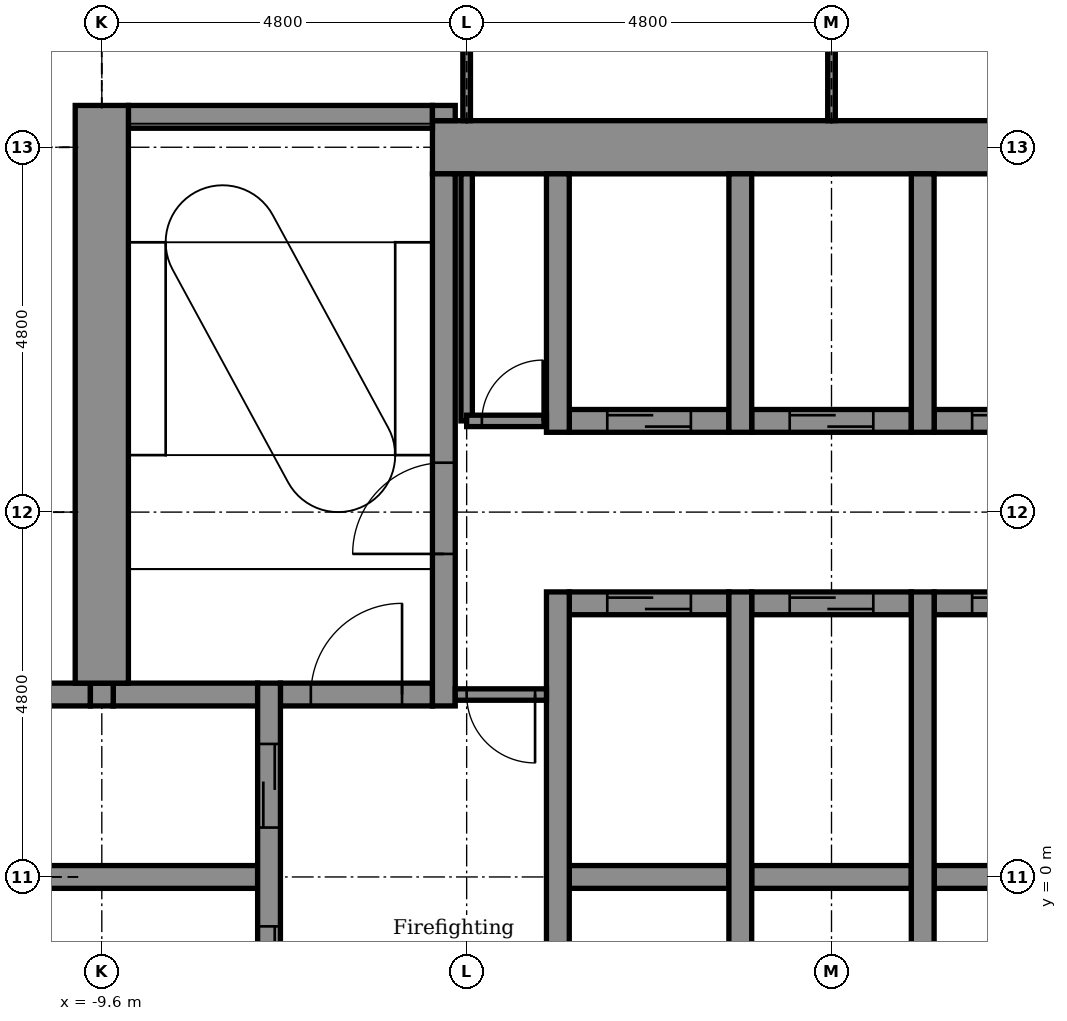
"""IFC4 building model, lengths in metres.
Left out: names, types, materials, properties, quantities, classifications, styles, units other than length and angle.
Written with IfcOpenShell. Run it as: python <this file> out.ifc"""

import sys

from ifc_helpers import new_model, si_unit, direction, frame, frame_2d, origin, place, context, subcontext, project, spatial, rectangle, extrude, element, fill, save


model = new_model("IFC4")
c1 = context("Model", 3, precision=1e-05, world=origin(), true_north=direction((0.0, 1.0)))
c2 = subcontext(c1, "Body", "Model", "MODEL_VIEW")
j1 = project(units=[si_unit("LENGTHUNIT", "METRE"), si_unit("PLANEANGLEUNIT", "RADIAN")], contexts=[c1])
p1 = place(None, origin())
s1 = spatial("IfcSite", under=j1, at=p1, CompositionType="ELEMENT")
p2 = place(p1, origin())
s2 = spatial("IfcBuilding", under=s1, at=p2, CompositionType="ELEMENT")
p3 = place(p2, frame((0.0, 0.0, 154.4)))
s3 = spatial("IfcBuildingStorey", under=s2, at=p3, CompositionType="ELEMENT", Elevation=154.4)
p4 = place(p3, frame((-10.85, 0.0, -0.15), z_axis=(0.0, 0.0, 1.0), x_axis=(1.0, 0.0, 0.0)))
e1 = element("IfcWall", 1, at=p4, inside=s3, PredefinedType="STANDARD", context=c2, shape_type="SweptSolid", body=[
    extrude(rectangle(XDim=3.3, YDim=0.3, at=frame_2d((1.65, 0.0))), origin(), (0.0, 0.0, 1.0), 3.9),
])
p5 = place(p3, frame((-3.45, 0.0, -0.15), z_axis=(0.0, 0.0, 1.0), x_axis=(1.0, 0.0, 0.0)))
e2 = element("IfcWall", 2, at=p5, inside=s3, PredefinedType="STANDARD", context=c2, shape_type="SweptSolid", body=[
    extrude(rectangle(XDim=2.1, YDim=0.3, at=frame_2d((1.05, 0.0))), origin(), (0.0, 0.0, 1.0), 3.9),
])
p6 = place(p3, frame((-1.05, 0.0, -0.15), z_axis=(0.0, 0.0, 1.0), x_axis=(1.0, 0.0, 0.0)))
e3 = element("IfcWall", 3, at=p6, inside=s3, PredefinedType="STANDARD", context=c2, shape_type="SweptSolid", body=[
    extrude(rectangle(XDim=2.1, YDim=0.3, at=frame_2d((1.05, 0.0))), origin(), (0.0, 0.0, 1.0), 3.9),
])
p7 = place(p3, frame((1.35, 0.0, -0.15), z_axis=(0.0, 0.0, 1.0), x_axis=(1.0, 0.0, 0.0)))
e4 = element("IfcWall", 4, at=p7, inside=s3, PredefinedType="STANDARD", context=c2, shape_type="SweptSolid", body=[
    extrude(rectangle(XDim=2.1, YDim=0.3, at=frame_2d((1.05, 0.0))), origin(), (0.0, 0.0, 1.0), 3.9),
])
p8 = place(p3, frame((-10.85, 2.4, -0.15), z_axis=(0.0, 0.0, 1.0), x_axis=(1.0, 0.0, 0.0)))
e5 = element("IfcWall", 5, at=p8, inside=s3, PredefinedType="STANDARD", context=c2, shape_type="SweptSolid", body=[
    extrude(rectangle(XDim=1.1, YDim=0.3, at=frame_2d((0.55, 0.0))), origin(), (0.0, 0.0, 1.0), 3.9),
])
p9 = place(p3, frame((-9.45, 2.4, -0.15), z_axis=(0.0, 0.0, 1.0), x_axis=(1.0, 0.0, 0.0)))
e6 = element("IfcWall", 6, at=p9, inside=s3, PredefinedType="STANDARD", context=c2, shape_type="SweptSolid", body=[
    extrude(rectangle(XDim=1.9, YDim=0.3, at=frame_2d((0.95, 0.0))), origin(), (0.0, 0.0, 1.0), 3.9),
])
p10 = place(p3, frame((-7.25, 2.4, -0.15), z_axis=(0.0, 0.0, 1.0), x_axis=(1.0, 0.0, 0.0)))
e7 = element("IfcWall", 7, at=p10, inside=s3, PredefinedType="STANDARD", context=c2, shape_type="SweptSolid", body=[
    extrude(rectangle(XDim=2.0, YDim=0.3, at=frame_2d((1.0, 0.0))), origin(), (0.0, 0.0, 1.0), 3.9),
])
p11 = place(p10, frame((0.4, 0.0, 0.15)))
e8 = element("IfcOpeningElement", 8, at=p11, cuts=e7, PredefinedType="OPENING", context=c2, shape_type="SweptSolid", body=[
    extrude(rectangle(XDim=1.2, YDim=2.1, at=frame_2d((0.6, 1.05))), frame((0.0, 0.16, 0.0), z_axis=(0.0, -1.0, 0.0), x_axis=(1.0, 0.0, 0.0)), (0.0, 0.0, 1.0), 0.32),
])
p12 = place(p3, frame((-3.45, 3.6, -0.15), z_axis=(0.0, 0.0, 1.0), x_axis=(1.0, 0.0, 0.0)))
e9 = element("IfcWall", 9, at=p12, inside=s3, PredefinedType="STANDARD", context=c2, shape_type="SweptSolid", body=[
    extrude(rectangle(XDim=2.1, YDim=0.3, at=frame_2d((1.05, 0.0))), origin(), (0.0, 0.0, 1.0), 3.9),
])
p13 = place(p12, frame((0.5, 0.0, 0.15)))
e10 = element("IfcOpeningElement", 10, at=p13, cuts=e9, PredefinedType="OPENING", context=c2, shape_type="SweptSolid", body=[
    extrude(rectangle(XDim=1.1, YDim=2.1, at=frame_2d((0.55, 1.05))), frame((0.0, 0.16, 0.0), z_axis=(0.0, -1.0, 0.0), x_axis=(1.0, 0.0, 0.0)), (0.0, 0.0, 1.0), 0.32),
])
p14 = place(p3, frame((-1.05, 3.6, -0.15), z_axis=(0.0, 0.0, 1.0), x_axis=(1.0, 0.0, 0.0)))
e11 = element("IfcWall", 11, at=p14, inside=s3, PredefinedType="STANDARD", context=c2, shape_type="SweptSolid", body=[
    extrude(rectangle(XDim=2.1, YDim=0.3, at=frame_2d((1.05, 0.0))), origin(), (0.0, 0.0, 1.0), 3.9),
])
p15 = place(p14, frame((0.5, 0.0, 0.15)))
e12 = element("IfcOpeningElement", 12, at=p15, cuts=e11, PredefinedType="OPENING", context=c2, shape_type="SweptSolid", body=[
    extrude(rectangle(XDim=1.1, YDim=2.1, at=frame_2d((0.55, 1.05))), frame((0.0, 0.16, 0.0), z_axis=(0.0, -1.0, 0.0), x_axis=(1.0, 0.0, 0.0)), (0.0, 0.0, 1.0), 0.32),
])
p16 = place(p3, frame((1.35, 3.6, -0.15), z_axis=(0.0, 0.0, 1.0), x_axis=(1.0, 0.0, 0.0)))
e13 = element("IfcWall", 13, at=p16, inside=s3, PredefinedType="STANDARD", context=c2, shape_type="SweptSolid", body=[
    extrude(rectangle(XDim=2.1, YDim=0.3, at=frame_2d((1.05, 0.0))), origin(), (0.0, 0.0, 1.0), 3.9),
])
p17 = place(p16, frame((0.5, 0.0, 0.15)))
e14 = element("IfcOpeningElement", 14, at=p17, cuts=e13, PredefinedType="OPENING", context=c2, shape_type="SweptSolid", body=[
    extrude(rectangle(XDim=1.1, YDim=2.1, at=frame_2d((0.55, 1.05))), frame((0.0, 0.16, 0.0), z_axis=(0.0, -1.0, 0.0), x_axis=(1.0, 0.0, 0.0)), (0.0, 0.0, 1.0), 0.32),
])
p18 = place(p3, frame((-3.45, 6.0, -0.15), z_axis=(0.0, 0.0, 1.0), x_axis=(1.0, 0.0, 0.0)))
e15 = element("IfcWall", 15, at=p18, inside=s3, PredefinedType="STANDARD", context=c2, shape_type="SweptSolid", body=[
    extrude(rectangle(XDim=2.1, YDim=0.3, at=frame_2d((1.05, 0.0))), origin(), (0.0, 0.0, 1.0), 3.9),
])
p19 = place(p18, frame((0.5, 0.0, 0.15)))
e16 = element("IfcOpeningElement", 16, at=p19, cuts=e15, PredefinedType="OPENING", context=c2, shape_type="SweptSolid", body=[
    extrude(rectangle(XDim=1.1, YDim=2.1, at=frame_2d((0.55, 1.05))), frame((0.0, 0.16, 0.0), z_axis=(0.0, -1.0, 0.0), x_axis=(1.0, 0.0, 0.0)), (0.0, 0.0, 1.0), 0.32),
])
p20 = place(p3, frame((-1.05, 6.0, -0.15), z_axis=(0.0, 0.0, 1.0), x_axis=(1.0, 0.0, 0.0)))
e17 = element("IfcWall", 17, at=p20, inside=s3, PredefinedType="STANDARD", context=c2, shape_type="SweptSolid", body=[
    extrude(rectangle(XDim=2.1, YDim=0.3, at=frame_2d((1.05, 0.0))), origin(), (0.0, 0.0, 1.0), 3.9),
])
p21 = place(p20, frame((0.5, 0.0, 0.15)))
e18 = element("IfcOpeningElement", 18, at=p21, cuts=e17, PredefinedType="OPENING", context=c2, shape_type="SweptSolid", body=[
    extrude(rectangle(XDim=1.1, YDim=2.1, at=frame_2d((0.55, 1.05))), frame((0.0, 0.16, 0.0), z_axis=(0.0, -1.0, 0.0), x_axis=(1.0, 0.0, 0.0)), (0.0, 0.0, 1.0), 0.32),
])
p22 = place(p3, frame((1.35, 6.0, -0.15), z_axis=(0.0, 0.0, 1.0), x_axis=(1.0, 0.0, 0.0)))
e19 = element("IfcWall", 19, at=p22, inside=s3, PredefinedType="STANDARD", context=c2, shape_type="SweptSolid", body=[
    extrude(rectangle(XDim=2.1, YDim=0.3, at=frame_2d((1.05, 0.0))), origin(), (0.0, 0.0, 1.0), 3.9),
])
p23 = place(p22, frame((0.5, 0.0, 0.15)))
e20 = element("IfcOpeningElement", 20, at=p23, cuts=e19, PredefinedType="OPENING", context=c2, shape_type="SweptSolid", body=[
    extrude(rectangle(XDim=1.1, YDim=2.1, at=frame_2d((0.55, 1.05))), frame((0.0, 0.16, 0.0), z_axis=(0.0, -1.0, 0.0), x_axis=(1.0, 0.0, 0.0)), (0.0, 0.0, 1.0), 0.32),
])
p24 = place(p3, frame((-5.25, 9.6, -0.15), z_axis=(0.0, 0.0, 1.0), x_axis=(1.0, 0.0, 0.0)))
e21 = element("IfcWall", 21, at=p24, inside=s3, PredefinedType="SHEAR", context=c2, shape_type="SweptSolid", body=[
    extrude(rectangle(XDim=14.5, YDim=0.7, at=frame_2d((7.25, 0.0))), origin(), (0.0, 0.0, 1.0), 3.9),
])
p25 = place(p24, frame((9.35, 0.0, 0.15)))
e22 = element("IfcOpeningElement", 22, at=p25, cuts=e21, PredefinedType="OPENING", context=c2, shape_type="SweptSolid", body=[
    extrude(rectangle(XDim=1.4, YDim=2.1, at=frame_2d((0.7, 1.05))), frame((0.0, 0.36, 0.0), z_axis=(0.0, -1.0, 0.0), x_axis=(1.0, 0.0, 0.0)), (0.0, 0.0, 1.0), 0.72),
])
p26 = place(p3, frame((-9.25, 10.0, -0.15), z_axis=(0.0, 0.0, 1.0), x_axis=(1.0, 0.0, 0.0)))
e23 = element("IfcWall", 23, at=p26, inside=s3, PredefinedType="STANDARD", context=c2, shape_type="SweptSolid", body=[
    extrude(rectangle(XDim=4.0, YDim=0.3, at=frame_2d((2.0, 0.0))), origin(), (0.0, 0.0, 1.0), 3.9),
])
p27 = place(p3, frame((-9.6, 2.25, -0.15), z_axis=(0.0, 0.0, 1.0), x_axis=(0.0, 1.0, 0.0)))
e24 = element("IfcWall", 24, at=p27, inside=s3, PredefinedType="STANDARD", context=c2, shape_type="SweptSolid", body=[
    extrude(rectangle(XDim=0.3, YDim=0.3, at=frame_2d((0.15, 0.0))), origin(), (0.0, 0.0, 1.0), 3.9),
])
p28 = place(p3, frame((-9.6, 2.55, -0.15), z_axis=(0.0, 0.0, 1.0), x_axis=(0.0, 1.0, 0.0)))
e25 = element("IfcWall", 25, at=p28, inside=s3, PredefinedType="SHEAR", context=c2, shape_type="SweptSolid", body=[
    extrude(rectangle(XDim=7.6, YDim=0.7, at=frame_2d((3.8, 0.0))), origin(), (0.0, 0.0, 1.0), 3.9),
])
p29 = place(p3, frame((-7.4, -2.55, -0.15), z_axis=(0.0, 0.0, 1.0), x_axis=(0.0, 1.0, 0.0)))
e26 = element("IfcWall", 26, at=p29, inside=s3, PredefinedType="STANDARD", context=c2, shape_type="SweptSolid", body=[
    extrude(rectangle(XDim=5.1, YDim=0.3, at=frame_2d((2.55, 0.0))), origin(), (0.0, 0.0, 1.0), 3.9),
])
p30 = place(p29, frame((0.8, 0.0, 0.15)))
e27 = element("IfcOpeningElement", 27, at=p30, cuts=e26, PredefinedType="OPENING", context=c2, shape_type="SweptSolid", body=[
    extrude(rectangle(XDim=1.1, YDim=2.1, at=frame_2d((0.55, 1.05))), frame((0.0, 0.16, 0.0), z_axis=(0.0, -1.0, 0.0), x_axis=(1.0, 0.0, 0.0)), (0.0, 0.0, 1.0), 0.32),
])
p31 = place(p29, frame((3.2, 0.0, 0.15)))
e28 = element("IfcOpeningElement", 28, at=p31, cuts=e26, PredefinedType="OPENING", context=c2, shape_type="SweptSolid", body=[
    extrude(rectangle(XDim=1.1, YDim=2.1, at=frame_2d((0.55, 1.05))), frame((0.0, 0.16, 0.0), z_axis=(0.0, -1.0, 0.0), x_axis=(1.0, 0.0, 0.0)), (0.0, 0.0, 1.0), 0.32),
])
p32 = place(p3, frame((-5.1, 2.25, -0.15), z_axis=(0.0, 0.0, 1.0), x_axis=(0.0, 1.0, 0.0)))
e29 = element("IfcWall", 29, at=p32, inside=s3, PredefinedType="STANDARD", context=c2, shape_type="SweptSolid", body=[
    extrude(rectangle(XDim=7.0, YDim=0.3, at=frame_2d((3.5, 0.0))), origin(), (0.0, 0.0, 1.0), 3.9),
])
p33 = place(p32, frame((2.0, 0.0, 0.15)))
e30 = element("IfcOpeningElement", 30, at=p33, cuts=e29, PredefinedType="OPENING", context=c2, shape_type="SweptSolid", body=[
    extrude(rectangle(XDim=1.2, YDim=2.1, at=frame_2d((0.6, 1.05))), frame((0.0, 0.16, 0.0), z_axis=(0.0, -1.0, 0.0), x_axis=(1.0, 0.0, 0.0)), (0.0, 0.0, 1.0), 0.32),
])
p34 = place(p3, frame((-5.1, 9.95, -0.15), z_axis=(0.0, 0.0, 1.0), x_axis=(0.0, 1.0, 0.0)))
e31 = element("IfcWall", 31, at=p34, inside=s3, PredefinedType="STANDARD", context=c2, shape_type="SweptSolid", body=[
    extrude(rectangle(XDim=0.2, YDim=0.3, at=frame_2d((0.1, 0.0))), origin(), (0.0, 0.0, 1.0), 3.9),
])
p35 = place(p3, frame((-3.6, -3.75, -0.15), z_axis=(0.0, 0.0, 1.0), x_axis=(0.0, 1.0, 0.0)))
e32 = element("IfcWall", 32, at=p35, inside=s3, PredefinedType="STANDARD", context=c2, shape_type="SweptSolid", body=[
    extrude(rectangle(XDim=7.5, YDim=0.3, at=frame_2d((3.75, 0.0))), origin(), (0.0, 0.0, 1.0), 3.9),
])
p36 = place(p3, frame((-3.6, 5.85, -0.15), z_axis=(0.0, 0.0, 1.0), x_axis=(0.0, 1.0, 0.0)))
e33 = element("IfcWall", 33, at=p36, inside=s3, PredefinedType="STANDARD", context=c2, shape_type="SweptSolid", body=[
    extrude(rectangle(XDim=3.4, YDim=0.3, at=frame_2d((1.7, 0.0))), origin(), (0.0, 0.0, 1.0), 3.9),
])
p37 = place(p3, frame((-1.2, -3.75, -0.15), z_axis=(0.0, 0.0, 1.0), x_axis=(0.0, 1.0, 0.0)))
e34 = element("IfcWall", 34, at=p37, inside=s3, PredefinedType="STANDARD", context=c2, shape_type="SweptSolid", body=[
    extrude(rectangle(XDim=7.5, YDim=0.3, at=frame_2d((3.75, 0.0))), origin(), (0.0, 0.0, 1.0), 3.9),
])
p38 = place(p3, frame((-1.2, 5.85, -0.15), z_axis=(0.0, 0.0, 1.0), x_axis=(0.0, 1.0, 0.0)))
e35 = element("IfcWall", 35, at=p38, inside=s3, PredefinedType="STANDARD", context=c2, shape_type="SweptSolid", body=[
    extrude(rectangle(XDim=3.4, YDim=0.3, at=frame_2d((1.7, 0.0))), origin(), (0.0, 0.0, 1.0), 3.9),
])
p39 = place(p3, frame((1.2, -3.75, -0.15), z_axis=(0.0, 0.0, 1.0), x_axis=(0.0, 1.0, 0.0)))
e36 = element("IfcWall", 36, at=p39, inside=s3, PredefinedType="STANDARD", context=c2, shape_type="SweptSolid", body=[
    extrude(rectangle(XDim=7.5, YDim=0.3, at=frame_2d((3.75, 0.0))), origin(), (0.0, 0.0, 1.0), 3.9),
])
p40 = place(p3, frame((1.2, 5.85, -0.15), z_axis=(0.0, 0.0, 1.0), x_axis=(0.0, 1.0, 0.0)))
e37 = element("IfcWall", 37, at=p40, inside=s3, PredefinedType="STANDARD", context=c2, shape_type="SweptSolid", body=[
    extrude(rectangle(XDim=3.4, YDim=0.3, at=frame_2d((1.7, 0.0))), origin(), (0.0, 0.0, 1.0), 3.9),
])
for number, where, z_axis, x_axis in (
    (38, (0.0, 9.95, 0.0), (0.0, 0.0, 1.0), (0.0, 1.0, 0.0)),
    (39, (-4.8, 9.95, 0.0), (0.0, 0.0, 1.0), (0.0, 1.0, 0.0)),
):
    element("IfcWall", number, at=place(p3, frame(where, z_axis=z_axis, x_axis=x_axis)), inside=s3, PredefinedType="PARTITIONING", context=c2, shape_type="SweptSolid", body=[
        extrude(rectangle(XDim=4.092, YDim=0.1, at=frame_2d((2.046, 0.0))), origin(), (0.0, 0.0, 1.0), 3.066),
    ])
p41 = place(p3, frame((-4.8, 6.0, 0.0), z_axis=(0.0, 0.0, 1.0), x_axis=(0.0, 1.0, 0.0)))
e40 = element("IfcWall", 40, at=p41, inside=s3, PredefinedType="PARTITIONING", context=c2, shape_type="SweptSolid", body=[
    extrude(rectangle(XDim=3.25, YDim=0.15, at=frame_2d((1.625, 0.0))), origin(), (0.0, 0.0, 1.0), 3.75),
])
p42 = place(p3, frame((-4.8, 6.0, 0.0), z_axis=(0.0, 0.0, 1.0), x_axis=(1.0, 0.0, 0.0)))
e41 = element("IfcWall", 41, at=p42, inside=s3, PredefinedType="PARTITIONING", context=c2, shape_type="SweptSolid", body=[
    extrude(rectangle(XDim=1.05, YDim=0.15, at=frame_2d((0.525, 0.0))), origin(), (0.0, 0.0, 1.0), 3.75),
])
p43 = place(p42, frame((0.2, 0.0, 0.0)))
e42 = element("IfcOpeningElement", 42, at=p43, cuts=e41, PredefinedType="OPENING", context=c2, shape_type="SweptSolid", body=[
    extrude(rectangle(XDim=0.8, YDim=2.1, at=frame_2d((0.4, 1.05))), frame((0.0, 0.085, 0.0), z_axis=(0.0, -1.0, 0.0), x_axis=(1.0, 0.0, 0.0)), (0.0, 0.0, 1.0), 0.17),
])
p44 = place(p3, frame((-4.95, 2.4, 0.0), z_axis=(0.0, 0.0, 1.0), x_axis=(1.0, 0.0, 0.0)))
e43 = element("IfcWall", 43, at=p44, inside=s3, PredefinedType="PARTITIONING", context=c2, shape_type="SweptSolid", body=[
    extrude(rectangle(XDim=1.2, YDim=0.15, at=frame_2d((0.6, 0.0))), origin(), (0.0, 0.0, 1.0), 3.75),
])
p45 = place(p44, frame((0.15, 0.0, 0.0)))
e44 = element("IfcOpeningElement", 44, at=p45, cuts=e43, PredefinedType="OPENING", context=c2, shape_type="SweptSolid", body=[
    extrude(rectangle(XDim=0.9, YDim=2.1, at=frame_2d((0.45, 1.05))), frame((0.0, 0.085, 0.0), z_axis=(0.0, -1.0, 0.0), x_axis=(1.0, 0.0, 0.0)), (0.0, 0.0, 1.0), 0.17),
])
p46 = place(p43, origin())
e45 = element("IfcDoor", 45, at=p46, inside=s3, OperationType="SINGLE_SWING_RIGHT", PredefinedType="DOOR", context=c2, shape_type="SweptSolid", body=[
    extrude(rectangle(XDim=0.8, YDim=2.1, at=frame_2d((0.4, 1.05))), frame((0.0, 0.025, 0.0), z_axis=(0.0, -1.0, 0.0), x_axis=(1.0, 0.0, 0.0)), (0.0, 0.0, 1.0), 0.05),
])
fill(e42, e45)
p47 = place(p30, origin())
e46 = element("IfcDoor", 46, at=p47, inside=s3, OperationType="DOUBLE_DOOR_SLIDING", PredefinedType="DOOR", context=c2, shape_type="SweptSolid", body=[
    extrude(rectangle(XDim=1.1, YDim=2.1, at=frame_2d((0.55, 1.05))), frame((0.0, 0.025, 0.0), z_axis=(0.0, -1.0, 0.0), x_axis=(1.0, 0.0, 0.0)), (0.0, 0.0, 1.0), 0.05),
])
fill(e27, e46)
p48 = place(p31, origin())
e47 = element("IfcDoor", 47, at=p48, inside=s3, OperationType="DOUBLE_DOOR_SLIDING", PredefinedType="DOOR", context=c2, shape_type="SweptSolid", body=[
    extrude(rectangle(XDim=1.1, YDim=2.1, at=frame_2d((0.55, 1.05))), frame((0.0, 0.025, 0.0), z_axis=(0.0, -1.0, 0.0), x_axis=(1.0, 0.0, 0.0)), (0.0, 0.0, 1.0), 0.05),
])
fill(e28, e47)
p49 = place(p19, origin())
e48 = element("IfcDoor", 48, at=p49, inside=s3, OperationType="DOUBLE_DOOR_SLIDING", PredefinedType="DOOR", context=c2, shape_type="SweptSolid", body=[
    extrude(rectangle(XDim=1.1, YDim=2.1, at=frame_2d((0.55, 1.05))), frame((0.0, 0.025, 0.0), z_axis=(0.0, -1.0, 0.0), x_axis=(1.0, 0.0, 0.0)), (0.0, 0.0, 1.0), 0.05),
])
fill(e16, e48)
p50 = place(p21, origin())
e49 = element("IfcDoor", 49, at=p50, inside=s3, OperationType="DOUBLE_DOOR_SLIDING", PredefinedType="DOOR", context=c2, shape_type="SweptSolid", body=[
    extrude(rectangle(XDim=1.1, YDim=2.1, at=frame_2d((0.55, 1.05))), frame((0.0, 0.025, 0.0), z_axis=(0.0, -1.0, 0.0), x_axis=(1.0, 0.0, 0.0)), (0.0, 0.0, 1.0), 0.05),
])
fill(e18, e49)
p51 = place(p23, origin())
e50 = element("IfcDoor", 50, at=p51, inside=s3, OperationType="DOUBLE_DOOR_SLIDING", PredefinedType="DOOR", context=c2, shape_type="SweptSolid", body=[
    extrude(rectangle(XDim=1.1, YDim=2.1, at=frame_2d((0.55, 1.05))), frame((0.0, 0.025, 0.0), z_axis=(0.0, -1.0, 0.0), x_axis=(1.0, 0.0, 0.0)), (0.0, 0.0, 1.0), 0.05),
])
fill(e20, e50)
p52 = place(p13, origin())
e51 = element("IfcDoor", 51, at=p52, inside=s3, OperationType="DOUBLE_DOOR_SLIDING", PredefinedType="DOOR", context=c2, shape_type="SweptSolid", body=[
    extrude(rectangle(XDim=1.1, YDim=2.1, at=frame_2d((0.55, 1.05))), frame((0.0, 0.025, 0.0), z_axis=(0.0, -1.0, 0.0), x_axis=(1.0, 0.0, 0.0)), (0.0, 0.0, 1.0), 0.05),
])
fill(e10, e51)
p53 = place(p15, origin())
e52 = element("IfcDoor", 52, at=p53, inside=s3, OperationType="DOUBLE_DOOR_SLIDING", PredefinedType="DOOR", context=c2, shape_type="SweptSolid", body=[
    extrude(rectangle(XDim=1.1, YDim=2.1, at=frame_2d((0.55, 1.05))), frame((0.0, 0.025, 0.0), z_axis=(0.0, -1.0, 0.0), x_axis=(1.0, 0.0, 0.0)), (0.0, 0.0, 1.0), 0.05),
])
fill(e12, e52)
p54 = place(p17, origin())
e53 = element("IfcDoor", 53, at=p54, inside=s3, OperationType="DOUBLE_DOOR_SLIDING", PredefinedType="DOOR", context=c2, shape_type="SweptSolid", body=[
    extrude(rectangle(XDim=1.1, YDim=2.1, at=frame_2d((0.55, 1.05))), frame((0.0, 0.025, 0.0), z_axis=(0.0, -1.0, 0.0), x_axis=(1.0, 0.0, 0.0)), (0.0, 0.0, 1.0), 0.05),
])
fill(e14, e53)
p55 = place(p33, origin())
e54 = element("IfcDoor", 54, at=p55, inside=s3, OperationType="SINGLE_SWING_LEFT", PredefinedType="DOOR", context=c2, shape_type="SweptSolid", body=[
    extrude(rectangle(XDim=1.2, YDim=2.1, at=frame_2d((0.6, 1.05))), frame((0.0, 0.025, 0.0), z_axis=(0.0, -1.0, 0.0), x_axis=(1.0, 0.0, 0.0)), (0.0, 0.0, 1.0), 0.05),
])
fill(e30, e54)
p56 = place(p45, frame((0.9, 0.0, 0.0), z_axis=(0.0, 0.0, 1.0), x_axis=(-1.0, 0.0, 0.0)))
e55 = element("IfcDoor", 55, at=p56, inside=s3, OperationType="SINGLE_SWING_RIGHT", PredefinedType="DOOR", context=c2, shape_type="SweptSolid", body=[
    extrude(rectangle(XDim=0.9, YDim=2.1, at=frame_2d((0.45, 1.05))), frame((0.0, 0.025, 0.0), z_axis=(0.0, -1.0, 0.0), x_axis=(1.0, 0.0, 0.0)), (0.0, 0.0, 1.0), 0.05),
])
fill(e44, e55)
p57 = place(p11, origin())
e56 = element("IfcDoor", 56, at=p57, inside=s3, OperationType="SINGLE_SWING_RIGHT", PredefinedType="DOOR", context=c2, shape_type="SweptSolid", body=[
    extrude(rectangle(XDim=1.2, YDim=2.1, at=frame_2d((0.6, 1.05))), frame((0.0, 0.025, 0.0), z_axis=(0.0, -1.0, 0.0), x_axis=(1.0, 0.0, 0.0)), (0.0, 0.0, 1.0), 0.05),
])
fill(e8, e56)
save(model, sys.argv[1])
